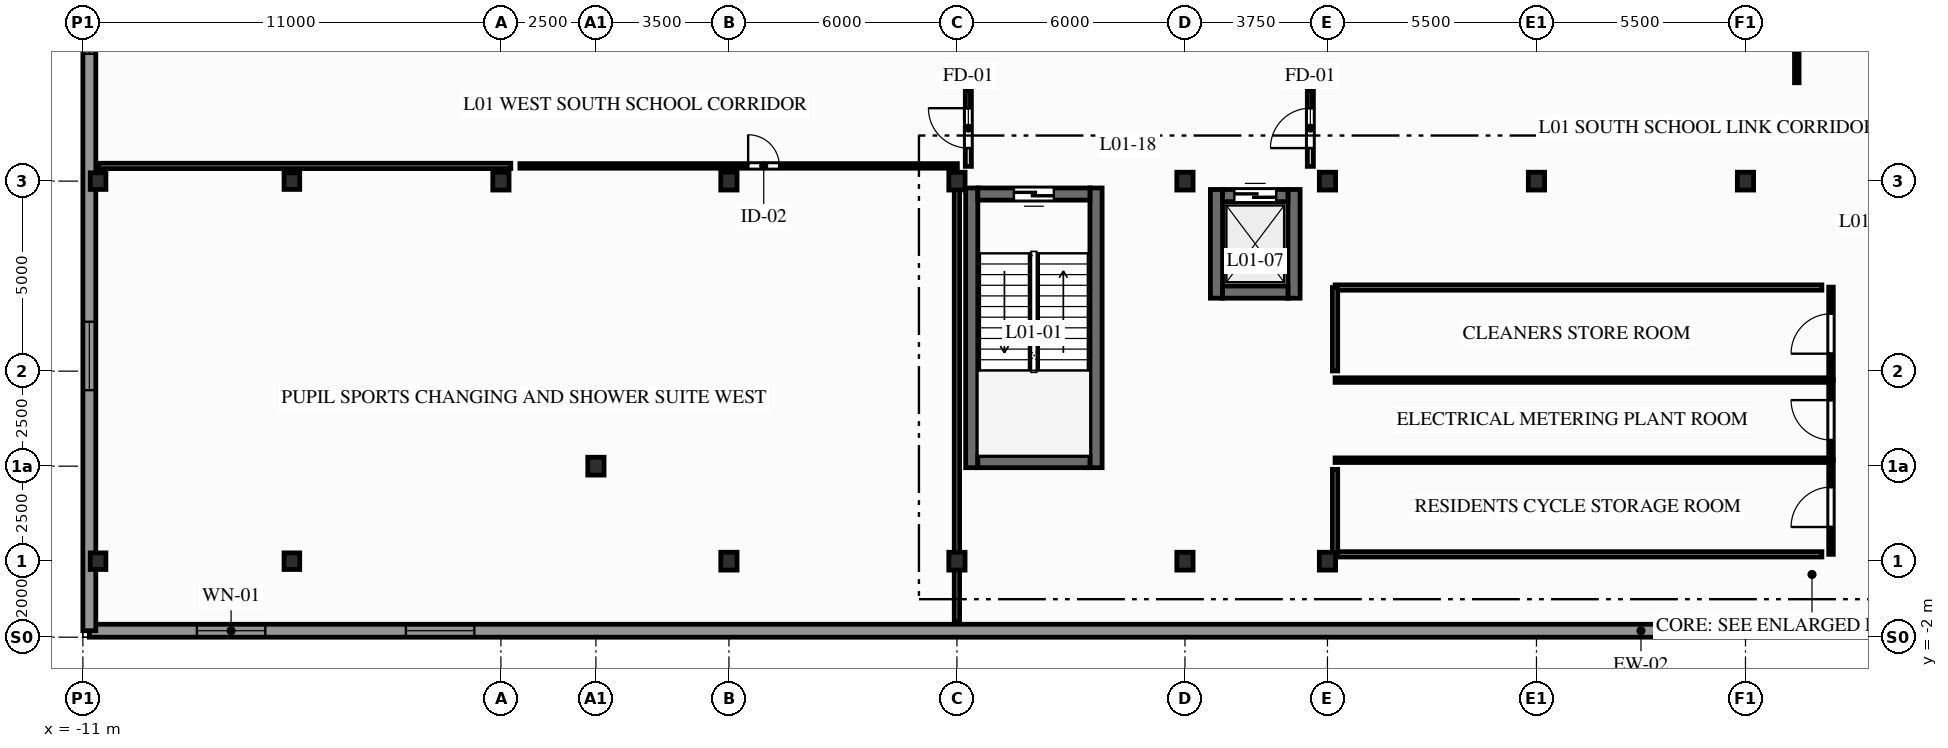
"""IFC4 building model, lengths in metres.
Left out: names, types, materials, properties, quantities, classifications, styles, units other than length and angle.
Written with IfcOpenShell. Run it as: python <this file> out.ifc"""

import sys

from ifc_helpers import new_model, si_unit, direction, frame, frame_2d, origin, origin_2d, place, context, subcontext, project, spatial, rectangle, i_section, extrude, element, fill, save


model = new_model("IFC4")
c1 = context("Model", 3, precision=1e-05, world=origin(), true_north=direction((0.0, 1.0)))
c2 = subcontext(c1, "Body", "Model", "MODEL_VIEW")
j1 = project(units=[si_unit("LENGTHUNIT", "METRE"), si_unit("PLANEANGLEUNIT", "RADIAN")], contexts=[c1])
p1 = place(None, origin())
s1 = spatial("IfcSite", under=j1, at=p1, CompositionType="ELEMENT")
p2 = place(p1, origin())
s2 = spatial("IfcBuilding", under=s1, at=p2, CompositionType="ELEMENT")
p3 = place(p2, frame((0.0, 0.0, 4.5)))
s3 = spatial("IfcBuildingStorey", under=s2, at=p3, CompositionType="ELEMENT", Elevation=4.5)
for number, where, z_axis, x_axis in (
    (1, (-10.6, 0.0, 0.0), (0.0, 0.0, 1.0), (1.0, 0.0, 0.0)),
    (2, (-10.6, 10.0, 0.0), (0.0, 0.0, 1.0), (1.0, 0.0, 0.0)),
    (3, (-5.5, 0.0, 0.0), (0.0, 0.0, 1.0), (1.0, 0.0, 0.0)),
    (4, (-5.5, 10.0, 0.0), (0.0, 0.0, 1.0), (1.0, 0.0, 0.0)),
):
    element("IfcColumn", number, at=place(p3, frame(where, z_axis=z_axis, x_axis=x_axis)), inside=s3, PredefinedType="COLUMN", context=c2, shape_type="SweptSolid", body=[
        extrude(i_section(OverallWidth=0.412, OverallDepth=0.437, WebThickness=0.036, FlangeThickness=0.058, FilletRadius=0.015, at=origin_2d()), origin(), (0.0, 0.0, 1.0), 4.5),
    ])
for number, where, z_axis, x_axis in (
    (5, (0.0, 10.0, 0.0), (0.0, 0.0, 1.0), (1.0, 0.0, 0.0)),
    (6, (2.5, 2.5, 0.0), (0.0, 0.0, 1.0), (1.0, 0.0, 0.0)),
    (7, (6.0, 0.0, 0.0), (0.0, 0.0, 1.0), (1.0, 0.0, 0.0)),
    (8, (6.0, 10.0, 0.0), (0.0, 0.0, 1.0), (1.0, 0.0, 0.0)),
    (9, (12.0, 0.0, 0.0), (0.0, 0.0, 1.0), (1.0, 0.0, 0.0)),
    (10, (12.0, 10.0, 0.0), (0.0, 0.0, 1.0), (1.0, 0.0, 0.0)),
    (11, (18.0, 0.0, 0.0), (0.0, 0.0, 1.0), (1.0, 0.0, 0.0)),
    (12, (18.0, 10.0, 0.0), (0.0, 0.0, 1.0), (1.0, 0.0, 0.0)),
    (13, (21.75, 0.0, 0.0), (0.0, 0.0, 1.0), (1.0, 0.0, 0.0)),
    (14, (21.75, 10.0, 0.0), (0.0, 0.0, 1.0), (1.0, 0.0, 0.0)),
    (15, (27.25, 10.0, 0.0), (0.0, 0.0, 1.0), (1.0, 0.0, 0.0)),
    (16, (32.75, 10.0, 0.0), (0.0, 0.0, 1.0), (1.0, 0.0, 0.0)),
):
    element("IfcColumn", number, at=place(p3, frame(where, z_axis=z_axis, x_axis=x_axis)), inside=s3, PredefinedType="COLUMN", context=c2, shape_type="SweptSolid", body=[
        extrude(i_section(OverallWidth=0.428, OverallDepth=0.469, WebThickness=0.078, FlangeThickness=0.125, FilletRadius=0.015, at=origin_2d()), origin(), (0.0, 0.0, 1.0), 4.5),
    ])
p4 = place(p3, frame((-10.83, -1.83, 0.0), z_axis=(0.0, 0.0, 1.0), x_axis=(1.0, 0.0, 0.0)))
e17 = element("IfcWall", 17, at=p4, inside=s3, PredefinedType="STANDARD", context=c2, shape_type="SweptSolid", body=[
    extrude(rectangle(XDim=81.66, YDim=0.34, at=frame_2d((40.83, 0.0))), origin(), (0.0, 0.0, 1.0), 4.22),
])
p5 = place(p4, frame((2.83, 0.0, 0.9)))
e18 = element("IfcOpeningElement", 18, at=p5, cuts=e17, PredefinedType="OPENING", context=c2, shape_type="SweptSolid", body=[
    extrude(rectangle(XDim=1.8, YDim=1.95, at=frame_2d((0.9, 0.975))), frame((0.0, 0.18, 0.0), z_axis=(0.0, -1.0, 0.0), x_axis=(1.0, 0.0, 0.0)), (0.0, 0.0, 1.0), 0.36),
])
p6 = place(p4, frame((8.33, 0.0, 0.9)))
e19 = element("IfcOpeningElement", 19, at=p6, cuts=e17, PredefinedType="OPENING", context=c2, shape_type="SweptSolid", body=[
    extrude(rectangle(XDim=1.8, YDim=1.95, at=frame_2d((0.9, 0.975))), frame((0.0, 0.18, 0.0), z_axis=(0.0, -1.0, 0.0), x_axis=(1.0, 0.0, 0.0)), (0.0, 0.0, 1.0), 0.36),
])
p7 = place(p4, frame((71.33, 0.0, 0.9)))
e20 = element("IfcOpeningElement", 20, at=p7, cuts=e17, PredefinedType="OPENING", context=c2, shape_type="SweptSolid", body=[
    extrude(rectangle(XDim=1.8, YDim=1.95, at=frame_2d((0.9, 0.975))), frame((0.0, 0.18, 0.0), z_axis=(0.0, -1.0, 0.0), x_axis=(1.0, 0.0, 0.0)), (0.0, 0.0, 1.0), 0.36),
])
p8 = place(p4, frame((76.83, 0.0, 0.9)))
e21 = element("IfcOpeningElement", 21, at=p8, cuts=e17, PredefinedType="OPENING", context=c2, shape_type="SweptSolid", body=[
    extrude(rectangle(XDim=1.8, YDim=1.95, at=frame_2d((0.9, 0.975))), frame((0.0, 0.18, 0.0), z_axis=(0.0, -1.0, 0.0), x_axis=(1.0, 0.0, 0.0)), (0.0, 0.0, 1.0), 0.36),
])
p9 = place(p3, frame((-10.83, 34.6, 0.0), z_axis=(0.0, 0.0, 1.0), x_axis=(0.0, -1.0, 0.0)))
e22 = element("IfcWall", 22, at=p9, inside=s3, PredefinedType="STANDARD", context=c2, shape_type="SweptSolid", body=[
    extrude(rectangle(XDim=36.43, YDim=0.34, at=frame_2d((18.215, 0.0))), origin(), (0.0, 0.0, 1.0), 3.583),
])
p10 = place(p9, frame((28.3, 0.0, 0.9)))
e23 = element("IfcOpeningElement", 23, at=p10, cuts=e22, PredefinedType="OPENING", context=c2, shape_type="SweptSolid", body=[
    extrude(rectangle(XDim=1.8, YDim=1.95, at=frame_2d((0.9, 0.975))), frame((0.0, 0.18, 0.0), z_axis=(0.0, -1.0, 0.0), x_axis=(1.0, 0.0, 0.0)), (0.0, 0.0, 1.0), 0.36),
])
p11 = place(p9, frame((19.45, 0.0, 0.9)))
e24 = element("IfcOpeningElement", 24, at=p11, cuts=e22, PredefinedType="OPENING", context=c2, shape_type="SweptSolid", body=[
    extrude(rectangle(XDim=1.8, YDim=1.95, at=frame_2d((0.9, 0.975))), frame((0.0, 0.18, 0.0), z_axis=(0.0, -1.0, 0.0), x_axis=(1.0, 0.0, 0.0)), (0.0, 0.0, 1.0), 0.36),
])
p12 = place(p9, frame((13.6, 0.0, 0.9)))
e25 = element("IfcOpeningElement", 25, at=p12, cuts=e22, PredefinedType="OPENING", context=c2, shape_type="SweptSolid", body=[
    extrude(rectangle(XDim=1.8, YDim=1.95, at=frame_2d((0.9, 0.975))), frame((0.0, 0.18, 0.0), z_axis=(0.0, -1.0, 0.0), x_axis=(1.0, 0.0, 0.0)), (0.0, 0.0, 1.0), 0.36),
])
p13 = place(p9, frame((6.0, 0.0, 0.9)))
e26 = element("IfcOpeningElement", 26, at=p13, cuts=e22, PredefinedType="OPENING", context=c2, shape_type="SweptSolid", body=[
    extrude(rectangle(XDim=1.8, YDim=1.95, at=frame_2d((0.9, 0.975))), frame((0.0, 0.18, 0.0), z_axis=(0.0, -1.0, 0.0), x_axis=(1.0, 0.0, 0.0)), (0.0, 0.0, 1.0), 0.36),
])
for number, where, z_axis, x_axis in (
    (27, (12.39, 2.46, 0.0), (0.0, 0.0, 1.0), (0.0, 1.0, 0.0)),
    (28, (15.66, 2.46, 0.0), (0.0, 0.0, 1.0), (0.0, 1.0, 0.0)),
):
    element("IfcWall", number, at=place(p3, frame(where, z_axis=z_axis, x_axis=x_axis)), inside=s3, PredefinedType="SHEAR", context=c2, shape_type="SweptSolid", body=[
        extrude(rectangle(XDim=7.36, YDim=0.32, at=frame_2d((3.68, 0.0))), origin(), (0.0, 0.0, 1.0), 4.22),
    ])
p14 = place(p3, frame((12.55, 2.62, 0.0), z_axis=(0.0, 0.0, 1.0), x_axis=(1.0, 0.0, 0.0)))
e29 = element("IfcWall", 29, at=p14, inside=s3, PredefinedType="SHEAR", context=c2, shape_type="SweptSolid", body=[
    extrude(rectangle(XDim=2.95, YDim=0.32, at=frame_2d((1.475, 0.0))), origin(), (0.0, 0.0, 1.0), 4.22),
])
p15 = place(p3, frame((15.5, 9.66, 0.0), z_axis=(0.0, 0.0, 1.0), x_axis=(-1.0, 0.0, 0.0)))
e30 = element("IfcWall", 30, at=p15, inside=s3, PredefinedType="SHEAR", context=c2, shape_type="SweptSolid", body=[
    extrude(rectangle(XDim=2.95, YDim=0.32, at=frame_2d((1.475, 0.0))), origin(), (0.0, 0.0, 1.0), 4.22),
])
p16 = place(p15, frame((0.95, 0.0, 0.0)))
e31 = element("IfcOpeningElement", 31, at=p16, cuts=e30, PredefinedType="OPENING", context=c2, shape_type="SweptSolid", body=[
    extrude(rectangle(XDim=1.05, YDim=2.06, at=frame_2d((0.525, 1.03))), frame((0.0, 0.17, 0.0), z_axis=(0.0, -1.0, 0.0), x_axis=(1.0, 0.0, 0.0)), (0.0, 0.0, 1.0), 0.34),
])
for number, where, z_axis, x_axis in (
    (32, (18.83, 6.92, 0.0), (0.0, 0.0, 1.0), (0.0, 1.0, 0.0)),
    (33, (20.87, 6.92, 0.0), (0.0, 0.0, 1.0), (0.0, 1.0, 0.0)),
):
    element("IfcWall", number, at=place(p3, frame(where, z_axis=z_axis, x_axis=x_axis)), inside=s3, PredefinedType="SHEAR", context=c2, shape_type="SweptSolid", body=[
        extrude(rectangle(XDim=2.86, YDim=0.32, at=frame_2d((1.43, 0.0))), origin(), (0.0, 0.0, 1.0), 4.22),
    ])
p17 = place(p3, frame((18.99, 7.08, 0.0), z_axis=(0.0, 0.0, 1.0), x_axis=(1.0, 0.0, 0.0)))
e34 = element("IfcWall", 34, at=p17, inside=s3, PredefinedType="SHEAR", context=c2, shape_type="SweptSolid", body=[
    extrude(rectangle(XDim=1.72, YDim=0.32, at=frame_2d((0.86, 0.0))), origin(), (0.0, 0.0, 1.0), 4.22),
])
p18 = place(p3, frame((18.99, 9.62, 0.0), z_axis=(0.0, 0.0, 1.0), x_axis=(1.0, 0.0, 0.0)))
e35 = element("IfcWall", 35, at=p18, inside=s3, PredefinedType="SHEAR", context=c2, shape_type="SweptSolid", body=[
    extrude(rectangle(XDim=1.72, YDim=0.32, at=frame_2d((0.86, 0.0))), origin(), (0.0, 0.0, 1.0), 4.22),
])
p19 = place(p18, frame((0.31, 0.0, 0.0)))
e36 = element("IfcOpeningElement", 36, at=p19, cuts=e35, PredefinedType="OPENING", context=c2, shape_type="SweptSolid", body=[
    extrude(rectangle(XDim=1.1, YDim=2.06, at=frame_2d((0.55, 1.03))), frame((0.0, 0.17, 0.0), z_axis=(0.0, -1.0, 0.0), x_axis=(1.0, 0.0, 0.0)), (0.0, 0.0, 1.0), 0.34),
])
p20 = place(p3, frame((35.0, 0.18, 0.0), z_axis=(0.0, 0.0, 1.0), x_axis=(0.0, 1.0, 0.0)))
e37 = element("IfcWall", 37, at=p20, inside=s3, PredefinedType="PARTITIONING", context=c2, shape_type="SweptSolid", body=[
    extrude(rectangle(XDim=2.488, YDim=0.12, at=frame_2d((1.244, 0.0))), origin(), (0.0, 0.0, 1.0), 4.22),
])
p21 = place(p20, frame((0.719, 0.0, 0.0)))
e38 = element("IfcOpeningElement", 38, at=p21, cuts=e37, PredefinedType="OPENING", context=c2, shape_type="SweptSolid", body=[
    extrude(rectangle(XDim=1.05, YDim=2.06, at=frame_2d((0.525, 1.03))), frame((0.0, 0.07, 0.0), z_axis=(0.0, -1.0, 0.0), x_axis=(1.0, 0.0, 0.0)), (0.0, 0.0, 1.0), 0.14),
])
p22 = place(p3, frame((35.0, 2.65, 0.0), z_axis=(0.0, 0.0, 1.0), x_axis=(0.0, 1.0, 0.0)))
e39 = element("IfcWall", 39, at=p22, inside=s3, PredefinedType="PARTITIONING", context=c2, shape_type="SweptSolid", body=[
    extrude(rectangle(XDim=2.127, YDim=0.12, at=frame_2d((1.063, 0.0))), origin(), (0.0, 0.0, 1.0), 4.22),
])
p23 = place(p22, frame((0.538, 0.0, 0.0)))
e40 = element("IfcOpeningElement", 40, at=p23, cuts=e39, PredefinedType="OPENING", context=c2, shape_type="SweptSolid", body=[
    extrude(rectangle(XDim=1.05, YDim=2.06, at=frame_2d((0.525, 1.03))), frame((0.0, 0.07, 0.0), z_axis=(0.0, -1.0, 0.0), x_axis=(1.0, 0.0, 0.0)), (0.0, 0.0, 1.0), 0.14),
])
p24 = place(p3, frame((35.0, 4.758, 0.0), z_axis=(0.0, 0.0, 1.0), x_axis=(0.0, 1.0, 0.0)))
e41 = element("IfcWall", 41, at=p24, inside=s3, PredefinedType="PARTITIONING", context=c2, shape_type="SweptSolid", body=[
    extrude(rectangle(XDim=2.453, YDim=0.12, at=frame_2d((1.227, 0.0))), origin(), (0.0, 0.0, 1.0), 3.738),
])
p25 = place(p24, frame((0.702, 0.0, 0.0)))
e42 = element("IfcOpeningElement", 42, at=p25, cuts=e41, PredefinedType="OPENING", context=c2, shape_type="SweptSolid", body=[
    extrude(rectangle(XDim=1.05, YDim=2.06, at=frame_2d((0.525, 1.03))), frame((0.0, 0.07, 0.0), z_axis=(0.0, -1.0, 0.0), x_axis=(1.0, 0.0, 0.0)), (0.0, 0.0, 1.0), 0.14),
])
for number, where, z_axis, x_axis in (
    (43, (21.95, 2.657, 0.0), (0.0, 0.0, 1.0), (1.0, 0.0, 0.0)),
    (44, (21.95, 4.765, 0.0), (0.0, 0.0, 1.0), (1.0, 0.0, 0.0)),
):
    element("IfcWall", number, at=place(p3, frame(where, z_axis=z_axis, x_axis=x_axis)), inside=s3, PredefinedType="PARTITIONING", context=c2, shape_type="SweptSolid", body=[
        extrude(rectangle(XDim=13.046, YDim=0.12, at=frame_2d((6.523, 0.0))), origin(), (0.0, 0.0, 1.0), 4.22),
    ])
p26 = place(p3, frame((12.3, 10.389, 0.0), z_axis=(0.0, 0.0, 1.0), x_axis=(0.0, 1.0, 0.0)))
e45 = element("IfcWall", 45, at=p26, inside=s3, PredefinedType="PARTITIONING", context=c2, shape_type="SweptSolid", body=[
    extrude(rectangle(XDim=2.011, YDim=0.16, at=frame_2d((1.006, 0.0))), origin(), (0.0, 0.0, 1.0), 4.22),
])
p27 = place(p26, frame((0.481, 0.0, 0.0)))
e46 = element("IfcOpeningElement", 46, at=p27, cuts=e45, PredefinedType="OPENING", context=c2, shape_type="SweptSolid", body=[
    extrude(rectangle(XDim=1.05, YDim=2.06, at=frame_2d((0.525, 1.03))), frame((0.0, 0.09, 0.0), z_axis=(0.0, -1.0, 0.0), x_axis=(1.0, 0.0, 0.0)), (0.0, 0.0, 1.0), 0.18),
])
p28 = place(p3, frame((21.3, 10.389, 0.0), z_axis=(0.0, 0.0, 1.0), x_axis=(0.0, 1.0, 0.0)))
e47 = element("IfcWall", 47, at=p28, inside=s3, PredefinedType="PARTITIONING", context=c2, shape_type="SweptSolid", body=[
    extrude(rectangle(XDim=2.011, YDim=0.16, at=frame_2d((1.006, 0.0))), origin(), (0.0, 0.0, 1.0), 4.22),
])
p29 = place(p28, frame((0.481, 0.0, 0.0)))
e48 = element("IfcOpeningElement", 48, at=p29, cuts=e47, PredefinedType="OPENING", context=c2, shape_type="SweptSolid", body=[
    extrude(rectangle(XDim=1.05, YDim=2.06, at=frame_2d((0.525, 1.03))), frame((0.0, 0.09, 0.0), z_axis=(0.0, -1.0, 0.0), x_axis=(1.0, 0.0, 0.0)), (0.0, 0.0, 1.0), 0.18),
])
p30 = place(p3, frame((0.5, 10.4, 0.0), z_axis=(0.0, 0.0, 1.0), x_axis=(1.0, 0.0, 0.0)))
e49 = element("IfcWall", 49, at=p30, inside=s3, PredefinedType="PARTITIONING", context=c2, shape_type="SweptSolid", body=[
    extrude(rectangle(XDim=11.511, YDim=0.12, at=frame_2d((5.756, 0.0))), origin(), (0.0, 0.0, 1.0), 4.22),
])
p31 = place(p30, frame((6.006, 0.0, 0.0)))
e50 = element("IfcOpeningElement", 50, at=p31, cuts=e49, PredefinedType="OPENING", context=c2, shape_type="SweptSolid", body=[
    extrude(rectangle(XDim=0.82, YDim=2.02, at=frame_2d((0.41, 1.01))), frame((0.0, 0.07, 0.0), z_axis=(0.0, -1.0, 0.0), x_axis=(1.0, 0.0, 0.0)), (0.0, 0.0, 1.0), 0.14),
])
p32 = place(p3, frame((34.1, 12.589, 0.0), z_axis=(0.0, 0.0, 1.0), x_axis=(0.0, 1.0, 0.0)))
e51 = element("IfcWall", 51, at=p32, inside=s3, PredefinedType="PARTITIONING", context=c2, shape_type="SweptSolid", body=[
    extrude(rectangle(XDim=17.823, YDim=0.12, at=frame_2d((8.911, 0.0))), origin(), (0.0, 0.0, 1.0), 4.22),
])
p33 = place(p32, frame((8.386, 0.0, 0.0)))
e52 = element("IfcOpeningElement", 52, at=p33, cuts=e51, PredefinedType="OPENING", context=c2, shape_type="SweptSolid", body=[
    extrude(rectangle(XDim=1.05, YDim=2.06, at=frame_2d((0.525, 1.03))), frame((0.0, 0.07, 0.0), z_axis=(0.0, -1.0, 0.0), x_axis=(1.0, 0.0, 0.0)), (0.0, 0.0, 1.0), 0.14),
])
p34 = place(p3, frame((21.95, 0.18, 0.0), z_axis=(0.0, 0.0, 1.0), x_axis=(1.0, 0.0, 0.0)))
e53 = element("IfcWall", 53, at=p34, inside=s3, PredefinedType="PARTITIONING", context=c2, shape_type="SweptSolid", body=[
    extrude(rectangle(XDim=12.81, YDim=0.14, at=frame_2d((6.405, 0.0))), origin(), (0.0, 0.0, 1.0), 3.583),
])
p35 = place(p3, frame((21.95, 0.18, 0.0), z_axis=(0.0, 0.0, 1.0), x_axis=(0.0, 1.0, 0.0)))
e54 = element("IfcWall", 54, at=p35, inside=s3, PredefinedType="PARTITIONING", context=c2, shape_type="SweptSolid", body=[
    extrude(rectangle(XDim=2.237, YDim=0.14, at=frame_2d((1.119, 0.0))), origin(), (0.0, 0.0, 1.0), 3.268),
])
p36 = place(p3, frame((21.95, 7.2, 0.0), z_axis=(0.0, 0.0, 1.0), x_axis=(1.0, 0.0, 0.0)))
e55 = element("IfcWall", 55, at=p36, inside=s3, PredefinedType="PARTITIONING", context=c2, shape_type="SweptSolid", body=[
    extrude(rectangle(XDim=12.81, YDim=0.14, at=frame_2d((6.405, 0.0))), origin(), (0.0, 0.0, 1.0), 4.22),
])
p37 = place(p3, frame((21.95, 5.005, 0.0), z_axis=(0.0, 0.0, 1.0), x_axis=(0.0, 1.0, 0.0)))
e56 = element("IfcWall", 56, at=p37, inside=s3, PredefinedType="PARTITIONING", context=c2, shape_type="SweptSolid", body=[
    extrude(rectangle(XDim=2.195, YDim=0.14, at=frame_2d((1.098, 0.0))), origin(), (0.0, 0.0, 1.0), 3.268),
])
p38 = place(p3, frame((12.0, -1.59, 0.0), z_axis=(0.0, 0.0, 1.0), x_axis=(0.0, 1.0, 0.0)))
e57 = element("IfcWall", 57, at=p38, inside=s3, PredefinedType="PARTITIONING", context=c2, shape_type="SweptSolid", body=[
    extrude(rectangle(XDim=11.75, YDim=0.14, at=frame_2d((5.875, 0.0))), origin(), (0.0, 0.0, 1.0), 3.268),
])
p39 = place(p3, frame((-10.59, 10.4, 0.0), z_axis=(0.0, 0.0, 1.0), x_axis=(1.0, 0.0, 0.0)))
e58 = element("IfcWall", 58, at=p39, inside=s3, PredefinedType="PARTITIONING", context=c2, shape_type="SweptSolid", body=[
    extrude(rectangle(XDim=10.85, YDim=0.14, at=frame_2d((5.425, 0.0))), origin(), (0.0, 0.0, 1.0), 3.268),
])
p40 = place(p5, origin())
e59 = element("IfcWindow", 59, at=p40, inside=s3, PartitioningType="SINGLE_PANEL", PredefinedType="WINDOW", context=c2, shape_type="SweptSolid", body=[
    extrude(rectangle(XDim=1.8, YDim=1.95, at=frame_2d((0.9, 0.975))), frame((0.0, 0.03, 0.0), z_axis=(0.0, -1.0, 0.0), x_axis=(1.0, 0.0, 0.0)), (0.0, 0.0, 1.0), 0.06),
])
fill(e18, e59)
p41 = place(p6, origin())
e60 = element("IfcWindow", 60, at=p41, inside=s3, PartitioningType="SINGLE_PANEL", PredefinedType="WINDOW", context=c2, shape_type="SweptSolid", body=[
    extrude(rectangle(XDim=1.8, YDim=1.95, at=frame_2d((0.9, 0.975))), frame((0.0, 0.03, 0.0), z_axis=(0.0, -1.0, 0.0), x_axis=(1.0, 0.0, 0.0)), (0.0, 0.0, 1.0), 0.06),
])
fill(e19, e60)
p42 = place(p10, origin())
e61 = element("IfcWindow", 61, at=p42, inside=s3, PartitioningType="SINGLE_PANEL", PredefinedType="WINDOW", context=c2, shape_type="SweptSolid", body=[
    extrude(rectangle(XDim=1.8, YDim=1.95, at=frame_2d((0.9, 0.975))), frame((0.0, 0.03, 0.0), z_axis=(0.0, -1.0, 0.0), x_axis=(1.0, 0.0, 0.0)), (0.0, 0.0, 1.0), 0.06),
])
fill(e23, e61)
p43 = place(p11, origin())
e62 = element("IfcWindow", 62, at=p43, inside=s3, PartitioningType="SINGLE_PANEL", PredefinedType="WINDOW", context=c2, shape_type="SweptSolid", body=[
    extrude(rectangle(XDim=1.8, YDim=1.95, at=frame_2d((0.9, 0.975))), frame((0.0, 0.03, 0.0), z_axis=(0.0, -1.0, 0.0), x_axis=(1.0, 0.0, 0.0)), (0.0, 0.0, 1.0), 0.06),
])
fill(e24, e62)
p44 = place(p16, origin())
e63 = element("IfcDoor", 63, at=p44, inside=s3, OperationType="SINGLE_SWING_LEFT", PredefinedType="DOOR", context=c2, shape_type="SweptSolid", body=[
    extrude(rectangle(XDim=1.05, YDim=2.06, at=frame_2d((0.525, 1.03))), frame((0.0, 0.025, 0.0), z_axis=(0.0, -1.0, 0.0), x_axis=(1.0, 0.0, 0.0)), (0.0, 0.0, 1.0), 0.05),
])
fill(e31, e63)
p45 = place(p19, origin())
e64 = element("IfcDoor", 64, at=p45, inside=s3, OperationType="SLIDING_TO_LEFT", PredefinedType="DOOR", context=c2, shape_type="SweptSolid", body=[
    extrude(rectangle(XDim=1.1, YDim=2.06, at=frame_2d((0.55, 1.03))), frame((0.0, 0.025, 0.0), z_axis=(0.0, -1.0, 0.0), x_axis=(1.0, 0.0, 0.0)), (0.0, 0.0, 1.0), 0.05),
])
fill(e36, e64)
p46 = place(p21, origin())
e65 = element("IfcDoor", 65, at=p46, inside=s3, OperationType="SINGLE_SWING_LEFT", PredefinedType="DOOR", context=c2, shape_type="SweptSolid", body=[
    extrude(rectangle(XDim=1.05, YDim=2.06, at=frame_2d((0.525, 1.03))), frame((0.0, 0.025, 0.0), z_axis=(0.0, -1.0, 0.0), x_axis=(1.0, 0.0, 0.0)), (0.0, 0.0, 1.0), 0.05),
])
fill(e38, e65)
p47 = place(p23, origin())
e66 = element("IfcDoor", 66, at=p47, inside=s3, OperationType="SINGLE_SWING_RIGHT", PredefinedType="DOOR", context=c2, shape_type="SweptSolid", body=[
    extrude(rectangle(XDim=1.05, YDim=2.06, at=frame_2d((0.525, 1.03))), frame((0.0, 0.025, 0.0), z_axis=(0.0, -1.0, 0.0), x_axis=(1.0, 0.0, 0.0)), (0.0, 0.0, 1.0), 0.05),
])
fill(e40, e66)
p48 = place(p25, origin())
e67 = element("IfcDoor", 67, at=p48, inside=s3, OperationType="SINGLE_SWING_LEFT", PredefinedType="DOOR", context=c2, shape_type="SweptSolid", body=[
    extrude(rectangle(XDim=1.05, YDim=2.06, at=frame_2d((0.525, 1.03))), frame((0.0, 0.025, 0.0), z_axis=(0.0, -1.0, 0.0), x_axis=(1.0, 0.0, 0.0)), (0.0, 0.0, 1.0), 0.05),
])
fill(e42, e67)
p49 = place(p27, origin())
e68 = element("IfcDoor", 68, at=p49, inside=s3, OperationType="SINGLE_SWING_RIGHT", PredefinedType="DOOR", context=c2, shape_type="SweptSolid", body=[
    extrude(rectangle(XDim=1.05, YDim=2.06, at=frame_2d((0.525, 1.03))), frame((0.0, 0.025, 0.0), z_axis=(0.0, -1.0, 0.0), x_axis=(1.0, 0.0, 0.0)), (0.0, 0.0, 1.0), 0.05),
])
fill(e46, e68)
p50 = place(p29, origin())
e69 = element("IfcDoor", 69, at=p50, inside=s3, OperationType="SINGLE_SWING_LEFT", PredefinedType="DOOR", context=c2, shape_type="SweptSolid", body=[
    extrude(rectangle(XDim=1.05, YDim=2.06, at=frame_2d((0.525, 1.03))), frame((0.0, 0.025, 0.0), z_axis=(0.0, -1.0, 0.0), x_axis=(1.0, 0.0, 0.0)), (0.0, 0.0, 1.0), 0.05),
])
fill(e48, e69)
p51 = place(p31, origin())
e70 = element("IfcDoor", 70, at=p51, inside=s3, OperationType="SINGLE_SWING_LEFT", PredefinedType="DOOR", context=c2, shape_type="SweptSolid", body=[
    extrude(rectangle(XDim=0.82, YDim=2.02, at=frame_2d((0.41, 1.01))), frame((0.0, 0.025, 0.0), z_axis=(0.0, -1.0, 0.0), x_axis=(1.0, 0.0, 0.0)), (0.0, 0.0, 1.0), 0.05),
])
fill(e50, e70)
save(model, sys.argv[1])
